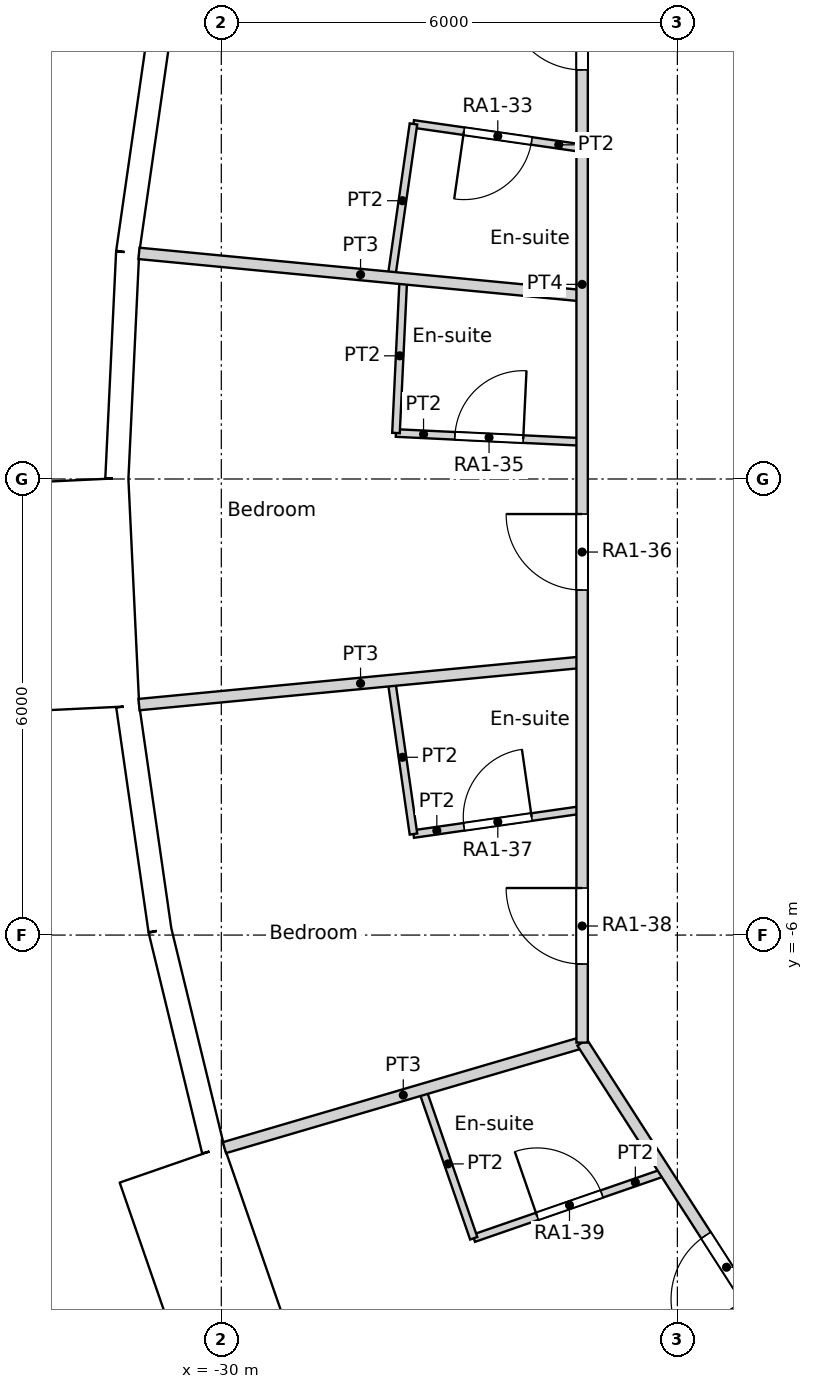
"""IFC4 building model, lengths in metres.
Left out: names, types, materials, properties, quantities, classifications, styles, units other than length and angle.
Written with IfcOpenShell. Run it as: python <this file> out.ifc"""

import sys

from ifc_helpers import new_model, si_unit, direction, frame, frame_2d, origin, origin_2d, place, context, subcontext, project, spatial, rectangle, circle, extrude, element, fill, save


model = new_model("IFC4")
c1 = context("Model", 3, precision=1e-05, world=origin(), true_north=direction((0.0, 1.0)))
c2 = subcontext(c1, "Body", "Model", "MODEL_VIEW")
j1 = project(units=[si_unit("LENGTHUNIT", "METRE"), si_unit("PLANEANGLEUNIT", "RADIAN")], contexts=[c1])
p1 = place(None, origin())
s1 = spatial("IfcSite", under=j1, at=p1, CompositionType="ELEMENT")
p2 = place(p1, origin())
s2 = spatial("IfcBuilding", under=s1, at=p2, CompositionType="ELEMENT")
p3 = place(p2, frame((0.0, 0.0, 28.2)))
s3 = spatial("IfcBuildingStorey", under=s2, at=p3, CompositionType="ELEMENT", Elevation=28.2)
for number, where, z_axis, x_axis in (
    (1, (-30.137, 2.878, 0.0), (0.0, 0.0, 1.0), (1.0, 0.0, 0.0)),
    (2, (-30.137, -2.878, 0.0), (0.0, 0.0, 1.0), (1.0, 0.0, 0.0)),
    (3, (-29.048, -8.529, 0.0), (0.0, 0.0, 1.0), (1.0, 0.0, 0.0)),
):
    element("IfcColumn", number, at=place(p3, frame(where, z_axis=z_axis, x_axis=x_axis)), inside=s3, PredefinedType="COLUMN", context=c2, shape_type="SweptSolid", body=[
        extrude(circle(Radius=0.7, at=origin_2d()), origin(), (0.0, 0.0, 1.0), 3.6),
    ])
for number, where, z_axis, x_axis in (
    (4, (-24.382, 2.85, 0.0), (0.0, 0.0, 1.0), (1.0, 0.0, 0.0)),
    (5, (-24.382, -2.85, 0.0), (0.0, 0.0, 1.0), (1.0, 0.0, 0.0)),
    (6, (-23.067, -8.396, 0.0), (0.0, 0.0, 1.0), (1.0, 0.0, 0.0)),
):
    element("IfcColumn", number, at=place(p3, frame(where, z_axis=z_axis, x_axis=x_axis)), inside=s3, PredefinedType="COLUMN", context=c2, shape_type="SweptSolid", body=[
        extrude(circle(Radius=0.75, at=origin_2d()), origin(), (0.0, 0.0, 1.0), 3.6),
    ])
p4 = place(p3, frame((-30.808, 5.932, 0.0), z_axis=(0.0, 0.0, 1.0), x_axis=(-0.142327539111, -0.989819615693, 0.0)))
e7 = element("IfcWall", 7, at=p4, inside=s3, PredefinedType="SOLIDWALL", context=c2, shape_type="SweptSolid", body=[
    extrude(rectangle(XDim=2.979, YDim=0.3, at=frame_2d((1.49, 0.0))), origin(), (0.0, 0.0, 1.0), 3.15),
])
p5 = place(p4, frame((1.49, 0.0, 1.55)))
e8 = element("IfcOpeningElement", 8, at=p5, cuts=e7, PredefinedType="OPENING", context=c2, shape_type="SweptSolid", body=[
    extrude(circle(Radius=0.9, at=origin_2d()), frame((0.0, 0.16, 0.0), z_axis=(0.0, -1.0, 0.0), x_axis=(1.0, 0.0, 0.0)), (0.0, 0.0, 1.0), 0.32),
])
p6 = place(p3, frame((-31.232, 2.982, 0.0), z_axis=(0.0, 0.0, 1.0), x_axis=(-0.047522328113, -0.998870175914, 0.0)))
e9 = element("IfcWall", 9, at=p6, inside=s3, PredefinedType="SOLIDWALL", context=c2, shape_type="SweptSolid", body=[
    extrude(rectangle(XDim=2.98, YDim=0.3, at=frame_2d((1.49, 0.0))), origin(), (0.0, 0.0, 1.0), 3.15),
])
p7 = place(p6, frame((1.49, 0.0, 1.55)))
e10 = element("IfcOpeningElement", 10, at=p7, cuts=e9, PredefinedType="OPENING", context=c2, shape_type="SweptSolid", body=[
    extrude(circle(Radius=0.9, at=origin_2d()), frame((0.0, 0.16, 0.0), z_axis=(0.0, -1.0, 0.0), x_axis=(1.0, 0.0, 0.0)), (0.0, 0.0, 1.0), 0.32),
])
p8 = place(p3, frame((-31.949, -0.02, -0.45), z_axis=(0.0, 0.0, 1.0), x_axis=(0.047607680889, -0.998866111509, 0.0)))
e11 = element("IfcWall", 11, at=p8, inside=s3, PredefinedType="ELEMENTEDWALL", context=c2, shape_type="SweptSolid", body=[
    extrude(rectangle(XDim=3.0, YDim=1.45, at=frame_2d((1.5, 0.0))), origin(), (0.0, 0.0, 1.0), 3.6),
])
p9 = place(p8, frame((1.5, 0.0, 2.0)))
e12 = element("IfcOpeningElement", 12, at=p9, cuts=e11, PredefinedType="OPENING", context=c2, shape_type="SweptSolid", body=[
    extrude(circle(Radius=0.9, at=origin_2d()), frame((0.0, 0.735, 0.0), z_axis=(0.0, -1.0, 0.0), x_axis=(1.0, 0.0, 0.0)), (0.0, 0.0, 1.0), 1.47),
])
p10 = place(p3, frame((-31.231, -2.988, 0.0), z_axis=(0.0, 0.0, 1.0), x_axis=(0.142315996627, -0.989821275334, 0.0)))
e13 = element("IfcWall", 13, at=p10, inside=s3, PredefinedType="SOLIDWALL", context=c2, shape_type="SweptSolid", body=[
    extrude(rectangle(XDim=2.98, YDim=0.3, at=frame_2d((1.49, 0.0))), origin(), (0.0, 0.0, 1.0), 3.15),
])
p11 = place(p10, frame((1.49, 0.0, 1.55)))
e14 = element("IfcOpeningElement", 14, at=p11, cuts=e13, PredefinedType="OPENING", context=c2, shape_type="SweptSolid", body=[
    extrude(circle(Radius=0.9, at=origin_2d()), frame((0.0, 0.16, 0.0), z_axis=(0.0, -1.0, 0.0), x_axis=(1.0, 0.0, 0.0)), (0.0, 0.0, 1.0), 0.32),
])
p12 = place(p3, frame((-30.807, -5.938, 0.0), z_axis=(0.0, 0.0, 1.0), x_axis=(0.235743081534, -0.971815414319, 0.0)))
e15 = element("IfcWall", 15, at=p12, inside=s3, PredefinedType="SOLIDWALL", context=c2, shape_type="SweptSolid", body=[
    extrude(rectangle(XDim=2.979, YDim=0.3, at=frame_2d((1.49, 0.0))), origin(), (0.0, 0.0, 1.0), 3.15),
])
p13 = place(p12, frame((1.49, 0.0, 1.55)))
e16 = element("IfcOpeningElement", 16, at=p13, cuts=e15, PredefinedType="OPENING", context=c2, shape_type="SweptSolid", body=[
    extrude(circle(Radius=0.9, at=origin_2d()), frame((0.0, 0.16, 0.0), z_axis=(0.0, -1.0, 0.0), x_axis=(1.0, 0.0, 0.0)), (0.0, 0.0, 1.0), 0.32),
])
p14 = place(p3, frame((-30.649, -9.021, -0.45), z_axis=(0.0, 0.0, 1.0), x_axis=(0.327071431777, -0.944999618262, 0.0)))
e17 = element("IfcWall", 17, at=p14, inside=s3, PredefinedType="ELEMENTEDWALL", context=c2, shape_type="SweptSolid", body=[
    extrude(rectangle(XDim=3.0, YDim=1.45, at=frame_2d((1.5, 0.0))), origin(), (0.0, 0.0, 1.0), 3.6),
])
p15 = place(p14, frame((1.5, 0.0, 2.0)))
e18 = element("IfcOpeningElement", 18, at=p15, cuts=e17, PredefinedType="OPENING", context=c2, shape_type="SweptSolid", body=[
    extrude(circle(Radius=0.9, at=origin_2d()), frame((0.0, 0.735, 0.0), z_axis=(0.0, -1.0, 0.0), x_axis=(1.0, 0.0, 0.0)), (0.0, 0.0, 1.0), 1.47),
])
p16 = place(p3, frame((-25.253, -7.415, 0.0), z_axis=(0.0, 0.0, 1.0), x_axis=(0.0, 1.0, 0.0)))
e19 = element("IfcWall", 19, at=p16, inside=s3, PredefinedType="PARTITIONING", context=c2, shape_type="SweptSolid", body=[
    extrude(rectangle(XDim=14.83, YDim=0.15, at=frame_2d((7.415, 0.0))), origin(), (0.0, 0.0, 1.0), 3.15),
])
p17 = place(p16, frame((12.797, 0.0, 0.0)))
e20 = element("IfcOpeningElement", 20, at=p17, cuts=e19, PredefinedType="OPENING", context=c2, shape_type="SweptSolid", body=[
    extrude(rectangle(XDim=1.0, YDim=2.1, at=frame_2d((0.5, 1.05))), frame((0.0, 0.075, 0.0), z_axis=(0.0, -1.0, 0.0), x_axis=(1.0, 0.0, 0.0)), (0.0, 0.0, 1.0), 0.15),
])
p18 = place(p16, frame((5.954, 0.0, 0.0)))
e21 = element("IfcOpeningElement", 21, at=p18, cuts=e19, PredefinedType="OPENING", context=c2, shape_type="SweptSolid", body=[
    extrude(rectangle(XDim=1.0, YDim=2.1, at=frame_2d((0.5, 1.05))), frame((0.0, 0.075, 0.0), z_axis=(0.0, -1.0, 0.0), x_axis=(1.0, 0.0, 0.0)), (0.0, 0.0, 1.0), 0.15),
])
p19 = place(p16, frame((1.034, 0.0, 0.0)))
e22 = element("IfcOpeningElement", 22, at=p19, cuts=e19, PredefinedType="OPENING", context=c2, shape_type="SweptSolid", body=[
    extrude(rectangle(XDim=1.0, YDim=2.1, at=frame_2d((0.5, 1.05))), frame((0.0, 0.075, 0.0), z_axis=(0.0, -1.0, 0.0), x_axis=(1.0, 0.0, 0.0)), (0.0, 0.0, 1.0), 0.15),
])
p20 = place(p3, frame((-25.252, -7.415, 0.0), z_axis=(0.0, 0.0, 1.0), x_axis=(0.540498462047, -0.84134500208, 0.0)))
e23 = element("IfcWall", 23, at=p20, inside=s3, PredefinedType="PARTITIONING", context=c2, shape_type="SweptSolid", body=[
    extrude(rectangle(XDim=12.811, YDim=0.15, at=frame_2d((6.405, 0.0))), origin(), (0.0, 0.0, 1.0), 3.15),
])
p21 = place(p20, frame((3.013, 0.0, 0.0)))
e24 = element("IfcOpeningElement", 24, at=p21, cuts=e23, PredefinedType="OPENING", context=c2, shape_type="SweptSolid", body=[
    extrude(rectangle(XDim=1.0, YDim=2.1, at=frame_2d((0.5, 1.05))), frame((0.0, 0.075, 0.0), z_axis=(0.0, -1.0, 0.0), x_axis=(1.0, 0.0, 0.0)), (0.0, 0.0, 1.0), 0.15),
])
p22 = place(p20, frame((5.452, 0.0, 0.0)))
e25 = element("IfcOpeningElement", 25, at=p22, cuts=e23, PredefinedType="OPENING", context=c2, shape_type="SweptSolid", body=[
    extrude(rectangle(XDim=1.0, YDim=2.1, at=frame_2d((0.5, 1.05))), frame((0.0, 0.075, 0.0), z_axis=(0.0, -1.0, 0.0), x_axis=(1.0, 0.0, 0.0)), (0.0, 0.0, 1.0), 0.15),
])
p23 = place(p20, frame((10.817, 0.0, 0.0)))
e26 = element("IfcOpeningElement", 26, at=p23, cuts=e23, PredefinedType="OPENING", context=c2, shape_type="SweptSolid", body=[
    extrude(rectangle(XDim=1.0, YDim=2.1, at=frame_2d((0.5, 1.05))), frame((0.0, 0.075, 0.0), z_axis=(0.0, -1.0, 0.0), x_axis=(1.0, 0.0, 0.0)), (0.0, 0.0, 1.0), 0.15),
])
p24 = place(p3, frame((-27.472, 4.671, 0.0), z_axis=(0.0, 0.0, 1.0), x_axis=(0.989833725002, -0.142229381104, 0.0)))
e27 = element("IfcWall", 27, at=p24, inside=s3, PredefinedType="PARTITIONING", context=c2, shape_type="SweptSolid", body=[
    extrude(rectangle(XDim=2.242, YDim=0.1, at=frame_2d((1.121, 0.0))), origin(), (0.0, 0.0, 1.0), 3.15),
])
p25 = place(p24, frame((0.671, 0.0, 0.0)))
e28 = element("IfcOpeningElement", 28, at=p25, cuts=e27, PredefinedType="OPENING", context=c2, shape_type="SweptSolid", body=[
    extrude(rectangle(XDim=0.9, YDim=2.04, at=frame_2d((0.45, 1.02))), frame((0.0, 0.05, 0.0), z_axis=(0.0, -1.0, 0.0), x_axis=(1.0, 0.0, 0.0)), (0.0, 0.0, 1.0), 0.1),
])
p26 = place(p3, frame((-27.762, 2.651, 0.0), z_axis=(0.0, 0.0, 1.0), x_axis=(0.142124766346, 0.989848751472, 0.0)))
e29 = element("IfcWall", 29, at=p26, inside=s3, PredefinedType="PARTITIONING", context=c2, shape_type="SweptSolid", body=[
    extrude(rectangle(XDim=2.041, YDim=0.1, at=frame_2d((1.021, 0.0))), origin(), (0.0, 0.0, 1.0), 3.15),
])
p27 = place(p3, frame((-31.083, 2.968, 0.0), z_axis=(0.0, 0.0, 1.0), x_axis=(0.995476905331, -0.095003847037, 0.0)))
e30 = element("IfcWall", 30, at=p27, inside=s3, PredefinedType="PARTITIONING", context=c2, shape_type="SweptSolid", body=[
    extrude(rectangle(XDim=5.857, YDim=0.15, at=frame_2d((2.928, 0.0))), origin(), (0.0, 0.0, 1.0), 3.15),
])
p28 = place(p3, frame((-27.702, 0.605, 0.0), z_axis=(0.0, 0.0, 1.0), x_axis=(0.047667833557, 0.998863242713, 0.0)))
e31 = element("IfcWall", 31, at=p28, inside=s3, PredefinedType="PARTITIONING", context=c2, shape_type="SweptSolid", body=[
    extrude(rectangle(XDim=2.033, YDim=0.1, at=frame_2d((1.017, 0.0))), origin(), (0.0, 0.0, 1.0), 3.15),
])
p29 = place(p3, frame((-27.702, 0.605, 0.0), z_axis=(0.0, 0.0, 1.0), x_axis=(0.998861820864, -0.047697618602, 0.0)))
e32 = element("IfcWall", 32, at=p29, inside=s3, PredefinedType="PARTITIONING", context=c2, shape_type="SweptSolid", body=[
    extrude(rectangle(XDim=2.452, YDim=0.1, at=frame_2d((1.226, 0.0))), origin(), (0.0, 0.0, 1.0), 3.15),
])
p30 = place(p29, frame((0.776, 0.0, 0.0)))
e33 = element("IfcOpeningElement", 33, at=p30, cuts=e32, PredefinedType="OPENING", context=c2, shape_type="SweptSolid", body=[
    extrude(rectangle(XDim=0.9, YDim=2.04, at=frame_2d((0.45, 1.02))), frame((0.0, 0.05, 0.0), z_axis=(0.0, -1.0, 0.0), x_axis=(1.0, 0.0, 0.0)), (0.0, 0.0, 1.0), 0.1),
])
p31 = place(p3, frame((-31.083, -2.968, 0.0), z_axis=(0.0, 0.0, 1.0), x_axis=(0.995456793999, 0.095214343879, 0.0)))
e34 = element("IfcWall", 34, at=p31, inside=s3, PredefinedType="PARTITIONING", context=c2, shape_type="SweptSolid", body=[
    extrude(rectangle(XDim=5.856, YDim=0.15, at=frame_2d((2.928, 0.0))), origin(), (0.0, 0.0, 1.0), 3.15),
])
p32 = place(p3, frame((-27.762, -2.651, 0.0), z_axis=(0.0, 0.0, 1.0), x_axis=(0.142124766346, -0.989848751472, 0.0)))
e35 = element("IfcWall", 35, at=p32, inside=s3, PredefinedType="PARTITIONING", context=c2, shape_type="SweptSolid", body=[
    extrude(rectangle(XDim=2.041, YDim=0.1, at=frame_2d((1.021, 0.0))), origin(), (0.0, 0.0, 1.0), 3.15),
])
p33 = place(p3, frame((-27.472, -4.671, 0.0), z_axis=(0.0, 0.0, 1.0), x_axis=(0.989833725002, 0.142229381104, 0.0)))
e36 = element("IfcWall", 36, at=p33, inside=s3, PredefinedType="PARTITIONING", context=c2, shape_type="SweptSolid", body=[
    extrude(rectangle(XDim=2.242, YDim=0.1, at=frame_2d((1.121, 0.0))), origin(), (0.0, 0.0, 1.0), 3.15),
])
p34 = place(p33, frame((0.671, 0.0, 0.0)))
e37 = element("IfcOpeningElement", 37, at=p34, cuts=e36, PredefinedType="OPENING", context=c2, shape_type="SweptSolid", body=[
    extrude(rectangle(XDim=0.9, YDim=2.04, at=frame_2d((0.45, 1.02))), frame((0.0, 0.05, 0.0), z_axis=(0.0, -1.0, 0.0), x_axis=(1.0, 0.0, 0.0)), (0.0, 0.0, 1.0), 0.1),
])
p35 = place(p3, frame((-29.959, -8.797, 0.0), z_axis=(0.0, 0.0, 1.0), x_axis=(0.959434430266, 0.281931860598, 0.0)))
e38 = element("IfcWall", 38, at=p35, inside=s3, PredefinedType="PARTITIONING", context=c2, shape_type="SweptSolid", body=[
    extrude(rectangle(XDim=4.905, YDim=0.15, at=frame_2d((2.452, 0.0))), origin(), (0.0, 0.0, 1.0), 3.15),
])
p36 = place(p3, frame((-27.356, -8.032, 0.0), z_axis=(0.0, 0.0, 1.0), x_axis=(0.326924291943, -0.945050531632, 0.0)))
e39 = element("IfcWall", 39, at=p36, inside=s3, PredefinedType="PARTITIONING", context=c2, shape_type="SweptSolid", body=[
    extrude(rectangle(XDim=2.071, YDim=0.1, at=frame_2d((1.035, 0.0))), origin(), (0.0, 0.0, 1.0), 3.15),
])
p37 = place(p3, frame((-26.679, -9.989, 0.0), z_axis=(0.0, 0.0, 1.0), x_axis=(0.945014370431, 0.327028805578, 0.0)))
e40 = element("IfcWall", 40, at=p37, inside=s3, PredefinedType="PARTITIONING", context=c2, shape_type="SweptSolid", body=[
    extrude(rectangle(XDim=2.667, YDim=0.1, at=frame_2d((1.333, 0.0))), origin(), (0.0, 0.0, 1.0), 3.15),
])
p38 = place(p37, frame((0.883, 0.0, 0.0)))
e41 = element("IfcOpeningElement", 41, at=p38, cuts=e40, PredefinedType="OPENING", context=c2, shape_type="SweptSolid", body=[
    extrude(rectangle(XDim=0.9, YDim=2.04, at=frame_2d((0.45, 1.02))), frame((0.0, 0.05, 0.0), z_axis=(0.0, -1.0, 0.0), x_axis=(1.0, 0.0, 0.0)), (0.0, 0.0, 1.0), 0.1),
])
p39 = place(p5, origin())
e42 = element("IfcWindow", 42, at=p39, inside=s3, PartitioningType="SINGLE_PANEL", PredefinedType="WINDOW", context=c2, shape_type="SweptSolid", body=[
    extrude(circle(Radius=0.9, at=origin_2d()), frame((0.0, 0.12, 0.0), z_axis=(0.0, -1.0, 0.0), x_axis=(1.0, 0.0, 0.0)), (0.0, 0.0, 1.0), 0.1),
])
fill(e8, e42)
p40 = place(p7, origin())
e43 = element("IfcWindow", 43, at=p40, inside=s3, PartitioningType="SINGLE_PANEL", PredefinedType="WINDOW", context=c2, shape_type="SweptSolid", body=[
    extrude(circle(Radius=0.9, at=origin_2d()), frame((0.0, 0.12, 0.0), z_axis=(0.0, -1.0, 0.0), x_axis=(1.0, 0.0, 0.0)), (0.0, 0.0, 1.0), 0.1),
])
fill(e10, e43)
p41 = place(p9, origin())
e44 = element("IfcWindow", 44, at=p41, inside=s3, PartitioningType="SINGLE_PANEL", PredefinedType="WINDOW", context=c2, shape_type="SweptSolid", body=[
    extrude(circle(Radius=0.9, at=origin_2d()), frame((0.0, 0.695, 0.0), z_axis=(0.0, -1.0, 0.0), x_axis=(1.0, 0.0, 0.0)), (0.0, 0.0, 1.0), 0.1),
])
fill(e12, e44)
p42 = place(p11, origin())
e45 = element("IfcWindow", 45, at=p42, inside=s3, PartitioningType="SINGLE_PANEL", PredefinedType="WINDOW", context=c2, shape_type="SweptSolid", body=[
    extrude(circle(Radius=0.9, at=origin_2d()), frame((0.0, 0.12, 0.0), z_axis=(0.0, -1.0, 0.0), x_axis=(1.0, 0.0, 0.0)), (0.0, 0.0, 1.0), 0.1),
])
fill(e14, e45)
p43 = place(p13, origin())
e46 = element("IfcWindow", 46, at=p43, inside=s3, PartitioningType="SINGLE_PANEL", PredefinedType="WINDOW", context=c2, shape_type="SweptSolid", body=[
    extrude(circle(Radius=0.9, at=origin_2d()), frame((0.0, 0.12, 0.0), z_axis=(0.0, -1.0, 0.0), x_axis=(1.0, 0.0, 0.0)), (0.0, 0.0, 1.0), 0.1),
])
fill(e16, e46)
p44 = place(p15, origin())
e47 = element("IfcWindow", 47, at=p44, inside=s3, PartitioningType="SINGLE_PANEL", PredefinedType="WINDOW", context=c2, shape_type="SweptSolid", body=[
    extrude(circle(Radius=0.9, at=origin_2d()), frame((0.0, 0.695, 0.0), z_axis=(0.0, -1.0, 0.0), x_axis=(1.0, 0.0, 0.0)), (0.0, 0.0, 1.0), 0.1),
])
fill(e18, e47)
p45 = place(p25, origin())
e48 = element("IfcDoor", 48, at=p45, inside=s3, OperationType="SINGLE_SWING_RIGHT", PredefinedType="DOOR", context=c2, shape_type="SweptSolid", body=[
    extrude(rectangle(XDim=0.9, YDim=2.04, at=frame_2d((0.45, 1.02))), frame((0.0, 0.025, 0.0), z_axis=(0.0, -1.0, 0.0), x_axis=(1.0, 0.0, 0.0)), (0.0, 0.0, 1.0), 0.05),
])
fill(e28, e48)
p46 = place(p17, origin())
e49 = element("IfcDoor", 49, at=p46, inside=s3, OperationType="SINGLE_SWING_RIGHT", PredefinedType="DOOR", context=c2, shape_type="SweptSolid", body=[
    extrude(rectangle(XDim=1.0, YDim=2.1, at=frame_2d((0.5, 1.05))), frame((0.0, 0.025, 0.0), z_axis=(0.0, -1.0, 0.0), x_axis=(1.0, 0.0, 0.0)), (0.0, 0.0, 1.0), 0.05),
])
fill(e20, e49)
p47 = place(p30, origin())
e50 = element("IfcDoor", 50, at=p47, inside=s3, OperationType="SINGLE_SWING_RIGHT", PredefinedType="DOOR", context=c2, shape_type="SweptSolid", body=[
    extrude(rectangle(XDim=0.9, YDim=2.04, at=frame_2d((0.45, 1.02))), frame((0.0, 0.025, 0.0), z_axis=(0.0, -1.0, 0.0), x_axis=(1.0, 0.0, 0.0)), (0.0, 0.0, 1.0), 0.05),
])
fill(e33, e50)
p48 = place(p18, origin())
e51 = element("IfcDoor", 51, at=p48, inside=s3, OperationType="SINGLE_SWING_RIGHT", PredefinedType="DOOR", context=c2, shape_type="SweptSolid", body=[
    extrude(rectangle(XDim=1.0, YDim=2.1, at=frame_2d((0.5, 1.05))), frame((0.0, 0.025, 0.0), z_axis=(0.0, -1.0, 0.0), x_axis=(1.0, 0.0, 0.0)), (0.0, 0.0, 1.0), 0.05),
])
fill(e21, e51)
p49 = place(p34, origin())
e52 = element("IfcDoor", 52, at=p49, inside=s3, OperationType="SINGLE_SWING_RIGHT", PredefinedType="DOOR", context=c2, shape_type="SweptSolid", body=[
    extrude(rectangle(XDim=0.9, YDim=2.04, at=frame_2d((0.45, 1.02))), frame((0.0, 0.025, 0.0), z_axis=(0.0, -1.0, 0.0), x_axis=(1.0, 0.0, 0.0)), (0.0, 0.0, 1.0), 0.05),
])
fill(e37, e52)
p50 = place(p19, origin())
e53 = element("IfcDoor", 53, at=p50, inside=s3, OperationType="SINGLE_SWING_RIGHT", PredefinedType="DOOR", context=c2, shape_type="SweptSolid", body=[
    extrude(rectangle(XDim=1.0, YDim=2.1, at=frame_2d((0.5, 1.05))), frame((0.0, 0.025, 0.0), z_axis=(0.0, -1.0, 0.0), x_axis=(1.0, 0.0, 0.0)), (0.0, 0.0, 1.0), 0.05),
])
fill(e22, e53)
p51 = place(p38, origin())
e54 = element("IfcDoor", 54, at=p51, inside=s3, OperationType="SINGLE_SWING_LEFT", PredefinedType="DOOR", context=c2, shape_type="SweptSolid", body=[
    extrude(rectangle(XDim=0.9, YDim=2.04, at=frame_2d((0.45, 1.02))), frame((0.0, 0.025, 0.0), z_axis=(0.0, -1.0, 0.0), x_axis=(1.0, 0.0, 0.0)), (0.0, 0.0, 1.0), 0.05),
])
fill(e41, e54)
p52 = place(p21, origin())
e55 = element("IfcDoor", 55, at=p52, inside=s3, OperationType="SINGLE_SWING_LEFT", PredefinedType="DOOR", context=c2, shape_type="SweptSolid", body=[
    extrude(rectangle(XDim=1.0, YDim=2.1, at=frame_2d((0.5, 1.05))), frame((0.0, 0.025, 0.0), z_axis=(0.0, -1.0, 0.0), x_axis=(1.0, 0.0, 0.0)), (0.0, 0.0, 1.0), 0.05),
])
fill(e24, e55)
save(model, sys.argv[1])
